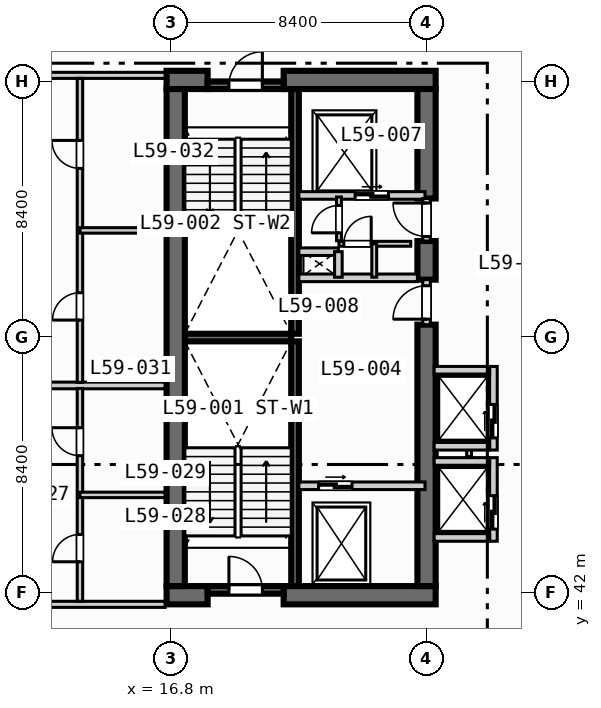
"""IFC4 building model, lengths in metres.
Left out: names, types, materials, properties, quantities, classifications, styles, units other than length and angle.
Written with IfcOpenShell. Run it as: python <this file> out.ifc"""

import sys

from ifc_helpers import new_model, si_unit, direction, frame, frame_2d, origin, place, context, subcontext, project, spatial, rectangle, extrude, element, fill, save


model = new_model("IFC4")
c1 = context("Model", 3, precision=1e-05, world=origin(), true_north=direction((0.0, 1.0)))
c2 = subcontext(c1, "Body", "Model", "MODEL_VIEW")
j1 = project(units=[si_unit("LENGTHUNIT", "METRE"), si_unit("PLANEANGLEUNIT", "RADIAN")], contexts=[c1])
p1 = place(None, origin())
s1 = spatial("IfcSite", under=j1, at=p1, CompositionType="ELEMENT")
p2 = place(p1, origin())
s2 = spatial("IfcBuilding", under=s1, at=p2, CompositionType="ELEMENT")
p3 = place(p2, frame((0.0, 0.0, 241.6)))
s3 = spatial("IfcBuildingStorey", under=s2, at=p3, CompositionType="ELEMENT", Elevation=241.6)
for number, where, z_axis, x_axis in (
    (1, (20.875, 42.2, 0.0), (0.0, 0.0, 1.0), (0.0, 1.0, 0.0)),
    (2, (20.875, 50.5, 0.0), (0.0, 0.0, 1.0), (0.0, 1.0, 0.0)),
):
    element("IfcWall", number, at=place(p3, frame(where, z_axis=z_axis, x_axis=x_axis)), inside=s3, PredefinedType="SOLIDWALL", context=c2, shape_type="SweptSolid", body=[
        extrude(rectangle(XDim=8.05, YDim=0.25, at=frame_2d((4.025, 0.0))), origin(), (0.0, 0.0, 1.0), 3.47),
    ])
p4 = place(p3, frame((17.25, 50.375, 0.0), z_axis=(0.0, 0.0, 1.0), x_axis=(1.0, 0.0, 0.0)))
e3 = element("IfcWall", 3, at=p4, inside=s3, PredefinedType="SOLIDWALL", context=c2, shape_type="SweptSolid", body=[
    extrude(rectangle(XDim=3.5, YDim=0.25, at=frame_2d((1.75, 0.0))), origin(), (0.0, 0.0, 1.0), 3.47),
])
p5 = place(p3, frame((16.65, 41.9, 0.0), z_axis=(0.0, 0.0, 1.0), x_axis=(1.0, 0.0, 0.0)))
e4 = element("IfcWall", 4, at=p5, inside=s3, PredefinedType="SHEAR", context=c2, shape_type="SweptSolid", body=[
    extrude(rectangle(XDim=1.35, YDim=0.6, at=frame_2d((0.675, 0.0))), origin(), (0.0, 0.0, 1.0), 3.47),
])
p6 = place(p3, frame((20.5, 41.9, 0.0), z_axis=(0.0, 0.0, 1.0), x_axis=(1.0, 0.0, 0.0)))
e5 = element("IfcWall", 5, at=p6, inside=s3, PredefinedType="SHEAR", context=c2, shape_type="SweptSolid", body=[
    extrude(rectangle(XDim=5.0, YDim=0.6, at=frame_2d((2.5, 0.0))), origin(), (0.0, 0.0, 1.0), 3.47),
])
p7 = place(p3, frame((16.65, 58.85, 0.0), z_axis=(0.0, 0.0, 1.0), x_axis=(1.0, 0.0, 0.0)))
e6 = element("IfcWall", 6, at=p7, inside=s3, PredefinedType="SHEAR", context=c2, shape_type="SweptSolid", body=[
    extrude(rectangle(XDim=1.35, YDim=0.6, at=frame_2d((0.675, 0.0))), origin(), (0.0, 0.0, 1.0), 3.47),
])
p8 = place(p3, frame((20.5, 58.85, 0.0), z_axis=(0.0, 0.0, 1.0), x_axis=(1.0, 0.0, 0.0)))
e7 = element("IfcWall", 7, at=p8, inside=s3, PredefinedType="SHEAR", context=c2, shape_type="SweptSolid", body=[
    extrude(rectangle(XDim=5.0, YDim=0.6, at=frame_2d((2.5, 0.0))), origin(), (0.0, 0.0, 1.0), 3.47),
])
p9 = place(p3, frame((16.95, 42.2, 0.0), z_axis=(0.0, 0.0, 1.0), x_axis=(0.0, 1.0, 0.0)))
e8 = element("IfcWall", 8, at=p9, inside=s3, PredefinedType="SHEAR", context=c2, shape_type="SweptSolid", body=[
    extrude(rectangle(XDim=16.35, YDim=0.6, at=frame_2d((8.175, 0.0))), origin(), (0.0, 0.0, 1.0), 3.47),
])
p10 = place(p3, frame((25.2, 42.2, 0.0), z_axis=(0.0, 0.0, 1.0), x_axis=(0.0, 1.0, 0.0)))
e9 = element("IfcWall", 9, at=p10, inside=s3, PredefinedType="SHEAR", context=c2, shape_type="SweptSolid", body=[
    extrude(rectangle(XDim=8.6, YDim=0.6, at=frame_2d((4.3, 0.0))), origin(), (0.0, 0.0, 1.0), 3.47),
])
p11 = place(p3, frame((25.2, 52.28, 0.0), z_axis=(0.0, 0.0, 1.0), x_axis=(0.0, 1.0, 0.0)))
e10 = element("IfcWall", 10, at=p11, inside=s3, PredefinedType="SHEAR", context=c2, shape_type="SweptSolid", body=[
    extrude(rectangle(XDim=1.27, YDim=0.6, at=frame_2d((0.635, 0.0))), origin(), (0.0, 0.0, 1.0), 3.47),
])
p12 = place(p3, frame((25.2, 54.95, 0.0), z_axis=(0.0, 0.0, 1.0), x_axis=(0.0, 1.0, 0.0)))
e11 = element("IfcWall", 11, at=p12, inside=s3, PredefinedType="SHEAR", context=c2, shape_type="SweptSolid", body=[
    extrude(rectangle(XDim=3.6, YDim=0.6, at=frame_2d((1.8, 0.0))), origin(), (0.0, 0.0, 1.0), 3.47),
])
p13 = place(p3, frame((18.0, 42.075, 0.0), z_axis=(0.0, 0.0, 1.0), x_axis=(1.0, 0.0, 0.0)))
e12 = element("IfcWall", 12, at=p13, inside=s3, PredefinedType="SOLIDWALL", context=c2, shape_type="SweptSolid", body=[
    extrude(rectangle(XDim=2.5, YDim=0.25, at=frame_2d((1.25, 0.0))), origin(), (0.0, 0.0, 1.0), 3.47),
])
p14 = place(p13, frame((0.7, 0.0, 0.0)))
e13 = element("IfcOpeningElement", 13, at=p14, cuts=e12, PredefinedType="OPENING", context=c2, shape_type="SweptSolid", body=[
    extrude(rectangle(XDim=1.1, YDim=2.15, at=frame_2d((0.55, 1.075))), frame((0.0, 0.135, 0.0), z_axis=(0.0, -1.0, 0.0), x_axis=(1.0, 0.0, 0.0)), (0.0, 0.0, 1.0), 0.27),
])
p15 = place(p3, frame((18.0, 58.675, 0.0), z_axis=(0.0, 0.0, 1.0), x_axis=(1.0, 0.0, 0.0)))
e14 = element("IfcWall", 14, at=p15, inside=s3, PredefinedType="SOLIDWALL", context=c2, shape_type="SweptSolid", body=[
    extrude(rectangle(XDim=2.5, YDim=0.25, at=frame_2d((1.25, 0.0))), origin(), (0.0, 0.0, 1.0), 3.47),
])
p16 = place(p15, frame((0.7, 0.0, 0.0)))
e15 = element("IfcOpeningElement", 15, at=p16, cuts=e14, PredefinedType="OPENING", context=c2, shape_type="SweptSolid", body=[
    extrude(rectangle(XDim=1.1, YDim=2.15, at=frame_2d((0.55, 1.075))), frame((0.0, 0.135, 0.0), z_axis=(0.0, -1.0, 0.0), x_axis=(1.0, 0.0, 0.0)), (0.0, 0.0, 1.0), 0.27),
])
p17 = place(p3, frame((21.0, 45.5, 0.0), z_axis=(0.0, 0.0, 1.0), x_axis=(1.0, 0.0, 0.0)))
e16 = element("IfcWall", 16, at=p17, inside=s3, PredefinedType="SOLIDWALL", context=c2, shape_type="SweptSolid", body=[
    extrude(rectangle(XDim=4.15, YDim=0.25, at=frame_2d((2.075, 0.0))), origin(), (0.0, 0.0, 1.0), 3.47),
])
p18 = place(p17, frame((0.65, 0.0, 0.0)))
e17 = element("IfcOpeningElement", 17, at=p18, cuts=e16, PredefinedType="OPENING", context=c2, shape_type="SweptSolid", body=[
    extrude(rectangle(XDim=1.1, YDim=2.15, at=frame_2d((0.55, 1.075))), frame((0.0, 0.135, 0.0), z_axis=(0.0, -1.0, 0.0), x_axis=(1.0, 0.0, 0.0)), (0.0, 0.0, 1.0), 0.27),
])
p19 = place(p3, frame((25.2, 50.8, 0.0), z_axis=(0.0, 0.0, 1.0), x_axis=(0.0, 1.0, 0.0)))
e18 = element("IfcWall", 18, at=p19, inside=s3, PredefinedType="SOLIDWALL", context=c2, shape_type="SweptSolid", body=[
    extrude(rectangle(XDim=1.48, YDim=0.25, at=frame_2d((0.74, 0.0))), origin(), (0.0, 0.0, 1.0), 3.47),
])
p20 = place(p19, frame((0.18, 0.0, 0.0)))
e19 = element("IfcOpeningElement", 19, at=p20, cuts=e18, PredefinedType="OPENING", context=c2, shape_type="SweptSolid", body=[
    extrude(rectangle(XDim=1.1, YDim=2.15, at=frame_2d((0.55, 1.075))), frame((0.0, 0.135, 0.0), z_axis=(0.0, -1.0, 0.0), x_axis=(1.0, 0.0, 0.0)), (0.0, 0.0, 1.0), 0.27),
])
p21 = place(p3, frame((21.0, 52.34, 0.0), z_axis=(0.0, 0.0, 1.0), x_axis=(1.0, 0.0, 0.0)))
e20 = element("IfcWall", 20, at=p21, inside=s3, PredefinedType="SOLIDWALL", context=c2, shape_type="SweptSolid", body=[
    extrude(rectangle(XDim=3.9, YDim=0.25, at=frame_2d((1.95, 0.0))), origin(), (0.0, 0.0, 1.0), 3.47),
])
p22 = place(p3, frame((21.0, 55.05, 0.0), z_axis=(0.0, 0.0, 1.0), x_axis=(1.0, 0.0, 0.0)))
e21 = element("IfcWall", 21, at=p22, inside=s3, PredefinedType="SOLIDWALL", context=c2, shape_type="SweptSolid", body=[
    extrude(rectangle(XDim=4.15, YDim=0.25, at=frame_2d((2.075, 0.0))), origin(), (0.0, 0.0, 1.0), 3.47),
])
p23 = place(p22, frame((1.85, 0.0, 0.0)))
e22 = element("IfcOpeningElement", 22, at=p23, cuts=e21, PredefinedType="OPENING", context=c2, shape_type="SweptSolid", body=[
    extrude(rectangle(XDim=1.1, YDim=2.15, at=frame_2d((0.55, 1.075))), frame((0.0, 0.135, 0.0), z_axis=(0.0, -1.0, 0.0), x_axis=(1.0, 0.0, 0.0)), (0.0, 0.0, 1.0), 0.27),
])
p24 = place(p3, frame((25.2, 53.55, 0.0), z_axis=(0.0, 0.0, 1.0), x_axis=(0.0, 1.0, 0.0)))
e23 = element("IfcWall", 23, at=p24, inside=s3, PredefinedType="SOLIDWALL", context=c2, shape_type="SweptSolid", body=[
    extrude(rectangle(XDim=1.4, YDim=0.25, at=frame_2d((0.7, 0.0))), origin(), (0.0, 0.0, 1.0), 3.47),
])
p25 = place(p24, frame((0.15, 0.0, 0.0)))
e24 = element("IfcOpeningElement", 24, at=p25, cuts=e23, PredefinedType="OPENING", context=c2, shape_type="SweptSolid", body=[
    extrude(rectangle(XDim=1.1, YDim=2.15, at=frame_2d((0.55, 1.075))), frame((0.0, 0.135, 0.0), z_axis=(0.0, -1.0, 0.0), x_axis=(1.0, 0.0, 0.0)), (0.0, 0.0, 1.0), 0.27),
])
p26 = place(p3, frame((21.0, 53.2, 0.0), z_axis=(0.0, 0.0, 1.0), x_axis=(1.0, 0.0, 0.0)))
e25 = element("IfcWall", 25, at=p26, inside=s3, PredefinedType="SOLIDWALL", context=c2, shape_type="SweptSolid", body=[
    extrude(rectangle(XDim=1.3, YDim=0.25, at=frame_2d((0.65, 0.0))), origin(), (0.0, 0.0, 1.0), 3.47),
])
p27 = place(p3, frame((22.3, 52.36, 0.0), z_axis=(0.0, 0.0, 1.0), x_axis=(0.0, 1.0, 0.0)))
e26 = element("IfcWall", 26, at=p27, inside=s3, PredefinedType="SOLIDWALL", context=c2, shape_type="SweptSolid", body=[
    extrude(rectangle(XDim=0.84, YDim=0.25, at=frame_2d((0.42, 0.0))), origin(), (0.0, 0.0, 1.0), 3.47),
])
p28 = place(p3, frame((22.32, 53.56, 0.0), z_axis=(0.0, 0.0, 1.0), x_axis=(0.0, 1.0, 0.0)))
e27 = element("IfcWall", 27, at=p28, inside=s3, PredefinedType="PARTITIONING", context=c2, shape_type="SweptSolid", body=[
    extrude(rectangle(XDim=1.44, YDim=0.16, at=frame_2d((0.72, 0.0))), origin(), (0.0, 0.0, 1.0), 3.47),
])
p29 = place(p28, frame((0.26, 0.0, 0.0)))
e28 = element("IfcOpeningElement", 28, at=p29, cuts=e27, PredefinedType="OPENING", context=c2, shape_type="SweptSolid", body=[
    extrude(rectangle(XDim=0.9, YDim=2.1, at=frame_2d((0.45, 1.05))), frame((0.0, 0.09, 0.0), z_axis=(0.0, -1.0, 0.0), x_axis=(1.0, 0.0, 0.0)), (0.0, 0.0, 1.0), 0.18),
])
p30 = place(p3, frame((22.32, 53.46, 0.0), z_axis=(0.0, 0.0, 1.0), x_axis=(1.0, 0.0, 0.0)))
e29 = element("IfcWall", 29, at=p30, inside=s3, PredefinedType="PARTITIONING", context=c2, shape_type="SweptSolid", body=[
    extrude(rectangle(XDim=2.36, YDim=0.16, at=frame_2d((1.18, 0.0))), origin(), (0.0, 0.0, 1.0), 3.47),
])
p31 = place(p30, frame((0.16, 0.0, 0.0)))
e30 = element("IfcOpeningElement", 30, at=p31, cuts=e29, PredefinedType="OPENING", context=c2, shape_type="SweptSolid", body=[
    extrude(rectangle(XDim=0.9, YDim=2.1, at=frame_2d((0.45, 1.05))), frame((0.0, 0.09, 0.0), z_axis=(0.0, -1.0, 0.0), x_axis=(1.0, 0.0, 0.0)), (0.0, 0.0, 1.0), 0.18),
])
p32 = place(p3, frame((23.48, 52.36, 0.0), z_axis=(0.0, 0.0, 1.0), x_axis=(0.0, 1.0, 0.0)))
e31 = element("IfcWall", 31, at=p32, inside=s3, PredefinedType="PARTITIONING", context=c2, shape_type="SweptSolid", body=[
    extrude(rectangle(XDim=1.1, YDim=0.16, at=frame_2d((0.55, 0.0))), origin(), (0.0, 0.0, 1.0), 3.47),
])
p33 = place(p3, frame((27.4, 43.675, 0.0), z_axis=(0.0, 0.0, 1.0), x_axis=(0.0, 1.0, 0.0)))
e32 = element("IfcWall", 32, at=p33, inside=s3, PredefinedType="SOLIDWALL", context=c2, shape_type="SweptSolid", body=[
    extrude(rectangle(XDim=2.75, YDim=0.25, at=frame_2d((1.375, 0.0))), origin(), (0.0, 0.0, 1.0), 3.47),
])
p34 = place(p33, frame((0.4, 0.0, 0.0)))
e33 = element("IfcOpeningElement", 33, at=p34, cuts=e32, PredefinedType="OPENING", context=c2, shape_type="SweptSolid", body=[
    extrude(rectangle(XDim=1.1, YDim=2.15, at=frame_2d((0.55, 1.075))), frame((0.0, 0.135, 0.0), z_axis=(0.0, -1.0, 0.0), x_axis=(1.0, 0.0, 0.0)), (0.0, 0.0, 1.0), 0.27),
])
for number, where, z_axis, x_axis in (
    (34, (25.45, 43.8, 0.0), (0.0, 0.0, 1.0), (1.0, 0.0, 0.0)),
    (35, (25.45, 46.3, 0.0), (0.0, 0.0, 1.0), (1.0, 0.0, 0.0)),
):
    element("IfcWall", number, at=place(p3, frame(where, z_axis=z_axis, x_axis=x_axis)), inside=s3, PredefinedType="SOLIDWALL", context=c2, shape_type="SweptSolid", body=[
        extrude(rectangle(XDim=1.825, YDim=0.25, at=frame_2d((0.913, 0.0))), origin(), (0.0, 0.0, 1.0), 3.47),
    ])
p35 = place(p3, frame((26.6, 46.46, 0.0), z_axis=(0.0, 0.0, 1.0), x_axis=(0.0, 1.0, 0.0)))
e36 = element("IfcWall", 36, at=p35, inside=s3, PredefinedType="PARTITIONING", context=c2, shape_type="SweptSolid", body=[
    extrude(rectangle(XDim=0.88, YDim=0.16, at=frame_2d((0.44, 0.0))), origin(), (0.0, 0.0, 1.0), 3.47),
])
p36 = place(p3, frame((27.4, 46.675, 0.0), z_axis=(0.0, 0.0, 1.0), x_axis=(0.0, 1.0, 0.0)))
e37 = element("IfcWall", 37, at=p36, inside=s3, PredefinedType="SOLIDWALL", context=c2, shape_type="SweptSolid", body=[
    extrude(rectangle(XDim=2.75, YDim=0.25, at=frame_2d((1.375, 0.0))), origin(), (0.0, 0.0, 1.0), 3.47),
])
p37 = place(p36, frame((0.4, 0.0, 0.0)))
e38 = element("IfcOpeningElement", 38, at=p37, cuts=e37, PredefinedType="OPENING", context=c2, shape_type="SweptSolid", body=[
    extrude(rectangle(XDim=1.1, YDim=2.15, at=frame_2d((0.55, 1.075))), frame((0.0, 0.135, 0.0), z_axis=(0.0, -1.0, 0.0), x_axis=(1.0, 0.0, 0.0)), (0.0, 0.0, 1.0), 0.27),
])
for number, where, z_axis, x_axis in (
    (39, (25.45, 46.8, 0.0), (0.0, 0.0, 1.0), (1.0, 0.0, 0.0)),
    (40, (25.45, 49.3, 0.0), (0.0, 0.0, 1.0), (1.0, 0.0, 0.0)),
):
    element("IfcWall", number, at=place(p3, frame(where, z_axis=z_axis, x_axis=x_axis)), inside=s3, PredefinedType="SOLIDWALL", context=c2, shape_type="SweptSolid", body=[
        extrude(rectangle(XDim=1.825, YDim=0.25, at=frame_2d((0.913, 0.0))), origin(), (0.0, 0.0, 1.0), 3.47),
    ])
p38 = place(p3, frame((8.65, 41.6, 0.0), z_axis=(0.0, 0.0, 1.0), x_axis=(1.0, 0.0, 0.0)))
e41 = element("IfcWall", 41, at=p38, inside=s3, PredefinedType="PARTITIONING", context=c2, shape_type="SweptSolid", body=[
    extrude(rectangle(XDim=7.95, YDim=0.2, at=frame_2d((3.975, 0.0))), origin(), (0.0, 0.0, 1.0), 3.47),
])
p39 = place(p38, frame((2.0, 0.0, 0.0)))
e42 = element("IfcOpeningElement", 42, at=p39, cuts=e41, PredefinedType="OPENING", context=c2, shape_type="SweptSolid", body=[
    extrude(rectangle(XDim=1.0, YDim=2.15, at=frame_2d((0.5, 1.075))), frame((0.0, 0.11, 0.0), z_axis=(0.0, -1.0, 0.0), x_axis=(1.0, 0.0, 0.0)), (0.0, 0.0, 1.0), 0.22),
])
p40 = place(p3, frame((8.65, 59.0, 0.0), z_axis=(0.0, 0.0, 1.0), x_axis=(1.0, 0.0, 0.0)))
e43 = element("IfcWall", 43, at=p40, inside=s3, PredefinedType="PARTITIONING", context=c2, shape_type="SweptSolid", body=[
    extrude(rectangle(XDim=7.95, YDim=0.2, at=frame_2d((3.975, 0.0))), origin(), (0.0, 0.0, 1.0), 2.853),
])
p41 = place(p40, frame((2.0, 0.0, 0.0)))
e44 = element("IfcOpeningElement", 44, at=p41, cuts=e43, PredefinedType="OPENING", context=c2, shape_type="SweptSolid", body=[
    extrude(rectangle(XDim=1.0, YDim=2.15, at=frame_2d((0.5, 1.075))), frame((0.0, 0.11, 0.0), z_axis=(0.0, -1.0, 0.0), x_axis=(1.0, 0.0, 0.0)), (0.0, 0.0, 1.0), 0.22),
])
p42 = place(p3, frame((8.65, 48.8, 0.0), z_axis=(0.0, 0.0, 1.0), x_axis=(1.0, 0.0, 0.0)))
e45 = element("IfcWall", 45, at=p42, inside=s3, PredefinedType="PARTITIONING", context=c2, shape_type="SweptSolid", body=[
    extrude(rectangle(XDim=7.95, YDim=0.22, at=frame_2d((3.975, 0.0))), origin(), (0.0, 0.0, 1.0), 3.47),
])
p43 = place(p3, frame((13.8, 41.7, 0.0), z_axis=(0.0, 0.0, 1.0), x_axis=(0.0, 1.0, 0.0)))
e46 = element("IfcWall", 46, at=p43, inside=s3, PredefinedType="PLUMBINGWALL", context=c2, shape_type="SweptSolid", body=[
    extrude(rectangle(XDim=7.0, YDim=0.18, at=frame_2d((3.5, 0.0))), origin(), (0.0, 0.0, 1.0), 3.47),
])
p44 = place(p43, frame((1.3, 0.0, 0.0)))
e47 = element("IfcOpeningElement", 47, at=p44, cuts=e46, PredefinedType="OPENING", context=c2, shape_type="SweptSolid", body=[
    extrude(rectangle(XDim=0.9, YDim=2.1, at=frame_2d((0.45, 1.05))), frame((0.0, 0.1, 0.0), z_axis=(0.0, -1.0, 0.0), x_axis=(1.0, 0.0, 0.0)), (0.0, 0.0, 1.0), 0.2),
])
p45 = place(p43, frame((4.79, 0.0, 0.0)))
e48 = element("IfcOpeningElement", 48, at=p45, cuts=e46, PredefinedType="OPENING", context=c2, shape_type="SweptSolid", body=[
    extrude(rectangle(XDim=0.92, YDim=2.1, at=frame_2d((0.46, 1.05))), frame((0.0, 0.1, 0.0), z_axis=(0.0, -1.0, 0.0), x_axis=(1.0, 0.0, 0.0)), (0.0, 0.0, 1.0), 0.2),
])
p46 = place(p3, frame((13.8, 45.2, 0.0), z_axis=(0.0, 0.0, 1.0), x_axis=(1.0, 0.0, 0.0)))
e49 = element("IfcWall", 49, at=p46, inside=s3, PredefinedType="PLUMBINGWALL", context=c2, shape_type="SweptSolid", body=[
    extrude(rectangle(XDim=2.8, YDim=0.18, at=frame_2d((1.4, 0.0))), origin(), (0.0, 0.0, 1.0), 3.47),
])
p47 = place(p3, frame((13.8, 48.9, 0.0), z_axis=(0.0, 0.0, 1.0), x_axis=(0.0, 1.0, 0.0)))
e50 = element("IfcWall", 50, at=p47, inside=s3, PredefinedType="PLUMBINGWALL", context=c2, shape_type="SweptSolid", body=[
    extrude(rectangle(XDim=10.0, YDim=0.18, at=frame_2d((5.0, 0.0))), origin(), (0.0, 0.0, 1.0), 3.47),
])
p48 = place(p47, frame((2.05, 0.0, 0.0)))
e51 = element("IfcOpeningElement", 51, at=p48, cuts=e50, PredefinedType="OPENING", context=c2, shape_type="SweptSolid", body=[
    extrude(rectangle(XDim=0.9, YDim=2.1, at=frame_2d((0.45, 1.05))), frame((0.0, 0.1, 0.0), z_axis=(0.0, -1.0, 0.0), x_axis=(1.0, 0.0, 0.0)), (0.0, 0.0, 1.0), 0.2),
])
p49 = place(p47, frame((7.04, 0.0, 0.0)))
e52 = element("IfcOpeningElement", 52, at=p49, cuts=e50, PredefinedType="OPENING", context=c2, shape_type="SweptSolid", body=[
    extrude(rectangle(XDim=0.92, YDim=2.1, at=frame_2d((0.46, 1.05))), frame((0.0, 0.1, 0.0), z_axis=(0.0, -1.0, 0.0), x_axis=(1.0, 0.0, 0.0)), (0.0, 0.0, 1.0), 0.2),
])
p50 = place(p3, frame((13.8, 53.9, 0.0), z_axis=(0.0, 0.0, 1.0), x_axis=(1.0, 0.0, 0.0)))
e53 = element("IfcWall", 53, at=p50, inside=s3, PredefinedType="PLUMBINGWALL", context=c2, shape_type="SweptSolid", body=[
    extrude(rectangle(XDim=2.8, YDim=0.18, at=frame_2d((1.4, 0.0))), origin(), (0.0, 0.0, 1.0), 3.47),
])
p51 = place(p14, origin())
e54 = element("IfcDoor", 54, at=p51, inside=s3, OperationType="SINGLE_SWING_LEFT", PredefinedType="DOOR", context=c2, shape_type="SweptSolid", body=[
    extrude(rectangle(XDim=1.1, YDim=2.15, at=frame_2d((0.55, 1.075))), frame((0.0, 0.025, 0.0), z_axis=(0.0, -1.0, 0.0), x_axis=(1.0, 0.0, 0.0)), (0.0, 0.0, 1.0), 0.05),
])
fill(e13, e54)
p52 = place(p16, origin())
e55 = element("IfcDoor", 55, at=p52, inside=s3, OperationType="SINGLE_SWING_RIGHT", PredefinedType="DOOR", context=c2, shape_type="SweptSolid", body=[
    extrude(rectangle(XDim=1.1, YDim=2.15, at=frame_2d((0.55, 1.075))), frame((0.0, 0.025, 0.0), z_axis=(0.0, -1.0, 0.0), x_axis=(1.0, 0.0, 0.0)), (0.0, 0.0, 1.0), 0.05),
])
fill(e15, e55)
p53 = place(p18, origin())
e56 = element("IfcDoor", 56, at=p53, inside=s3, OperationType="SLIDING_TO_LEFT", PredefinedType="DOOR", context=c2, shape_type="SweptSolid", body=[
    extrude(rectangle(XDim=1.1, YDim=2.15, at=frame_2d((0.55, 1.075))), frame((0.0, 0.025, 0.0), z_axis=(0.0, -1.0, 0.0), x_axis=(1.0, 0.0, 0.0)), (0.0, 0.0, 1.0), 0.05),
])
fill(e17, e56)
p54 = place(p20, origin())
e57 = element("IfcDoor", 57, at=p54, inside=s3, OperationType="SINGLE_SWING_LEFT", PredefinedType="DOOR", context=c2, shape_type="SweptSolid", body=[
    extrude(rectangle(XDim=1.1, YDim=2.15, at=frame_2d((0.55, 1.075))), frame((0.0, 0.025, 0.0), z_axis=(0.0, -1.0, 0.0), x_axis=(1.0, 0.0, 0.0)), (0.0, 0.0, 1.0), 0.05),
])
fill(e19, e57)
p55 = place(p23, origin())
e58 = element("IfcDoor", 58, at=p55, inside=s3, OperationType="SLIDING_TO_LEFT", PredefinedType="DOOR", context=c2, shape_type="SweptSolid", body=[
    extrude(rectangle(XDim=1.1, YDim=2.15, at=frame_2d((0.55, 1.075))), frame((0.0, 0.025, 0.0), z_axis=(0.0, -1.0, 0.0), x_axis=(1.0, 0.0, 0.0)), (0.0, 0.0, 1.0), 0.05),
])
fill(e22, e58)
p56 = place(p25, origin())
e59 = element("IfcDoor", 59, at=p56, inside=s3, OperationType="SINGLE_SWING_RIGHT", PredefinedType="DOOR", context=c2, shape_type="SweptSolid", body=[
    extrude(rectangle(XDim=1.1, YDim=2.15, at=frame_2d((0.55, 1.075))), frame((0.0, 0.025, 0.0), z_axis=(0.0, -1.0, 0.0), x_axis=(1.0, 0.0, 0.0)), (0.0, 0.0, 1.0), 0.05),
])
fill(e24, e59)
p57 = place(p29, origin())
e60 = element("IfcDoor", 60, at=p57, inside=s3, OperationType="SINGLE_SWING_LEFT", PredefinedType="DOOR", context=c2, shape_type="SweptSolid", body=[
    extrude(rectangle(XDim=0.9, YDim=2.1, at=frame_2d((0.45, 1.05))), frame((0.0, 0.025, 0.0), z_axis=(0.0, -1.0, 0.0), x_axis=(1.0, 0.0, 0.0)), (0.0, 0.0, 1.0), 0.05),
])
fill(e28, e60)
p58 = place(p31, origin())
e61 = element("IfcDoor", 61, at=p58, inside=s3, OperationType="SINGLE_SWING_RIGHT", PredefinedType="DOOR", context=c2, shape_type="SweptSolid", body=[
    extrude(rectangle(XDim=0.9, YDim=2.1, at=frame_2d((0.45, 1.05))), frame((0.0, 0.025, 0.0), z_axis=(0.0, -1.0, 0.0), x_axis=(1.0, 0.0, 0.0)), (0.0, 0.0, 1.0), 0.05),
])
fill(e30, e61)
p59 = place(p34, origin())
e62 = element("IfcDoor", 62, at=p59, inside=s3, OperationType="SLIDING_TO_LEFT", PredefinedType="DOOR", context=c2, shape_type="SweptSolid", body=[
    extrude(rectangle(XDim=1.1, YDim=2.15, at=frame_2d((0.55, 1.075))), frame((0.0, 0.025, 0.0), z_axis=(0.0, -1.0, 0.0), x_axis=(1.0, 0.0, 0.0)), (0.0, 0.0, 1.0), 0.05),
])
fill(e33, e62)
p60 = place(p37, origin())
e63 = element("IfcDoor", 63, at=p60, inside=s3, OperationType="SLIDING_TO_LEFT", PredefinedType="DOOR", context=c2, shape_type="SweptSolid", body=[
    extrude(rectangle(XDim=1.1, YDim=2.15, at=frame_2d((0.55, 1.075))), frame((0.0, 0.025, 0.0), z_axis=(0.0, -1.0, 0.0), x_axis=(1.0, 0.0, 0.0)), (0.0, 0.0, 1.0), 0.05),
])
fill(e38, e63)
p61 = place(p44, origin())
e64 = element("IfcDoor", 64, at=p61, inside=s3, OperationType="SINGLE_SWING_LEFT", PredefinedType="DOOR", context=c2, shape_type="SweptSolid", body=[
    extrude(rectangle(XDim=0.9, YDim=2.1, at=frame_2d((0.45, 1.05))), frame((0.0, 0.025, 0.0), z_axis=(0.0, -1.0, 0.0), x_axis=(1.0, 0.0, 0.0)), (0.0, 0.0, 1.0), 0.05),
])
fill(e47, e64)
p62 = place(p45, origin())
e65 = element("IfcDoor", 65, at=p62, inside=s3, OperationType="SINGLE_SWING_RIGHT", PredefinedType="DOOR", context=c2, shape_type="SweptSolid", body=[
    extrude(rectangle(XDim=0.92, YDim=2.1, at=frame_2d((0.46, 1.05))), frame((0.0, 0.025, 0.0), z_axis=(0.0, -1.0, 0.0), x_axis=(1.0, 0.0, 0.0)), (0.0, 0.0, 1.0), 0.05),
])
fill(e48, e65)
p63 = place(p48, origin())
e66 = element("IfcDoor", 66, at=p63, inside=s3, OperationType="SINGLE_SWING_LEFT", PredefinedType="DOOR", context=c2, shape_type="SweptSolid", body=[
    extrude(rectangle(XDim=0.9, YDim=2.1, at=frame_2d((0.45, 1.05))), frame((0.0, 0.025, 0.0), z_axis=(0.0, -1.0, 0.0), x_axis=(1.0, 0.0, 0.0)), (0.0, 0.0, 1.0), 0.05),
])
fill(e51, e66)
p64 = place(p49, origin())
e67 = element("IfcDoor", 67, at=p64, inside=s3, OperationType="SINGLE_SWING_RIGHT", PredefinedType="DOOR", context=c2, shape_type="SweptSolid", body=[
    extrude(rectangle(XDim=0.92, YDim=2.1, at=frame_2d((0.46, 1.05))), frame((0.0, 0.025, 0.0), z_axis=(0.0, -1.0, 0.0), x_axis=(1.0, 0.0, 0.0)), (0.0, 0.0, 1.0), 0.05),
])
fill(e52, e67)
save(model, sys.argv[1])
